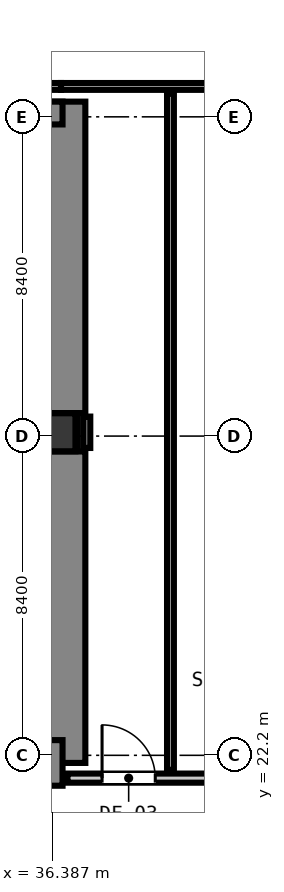
"""IFC4 building model, lengths in metres.
Left out: names, types, materials, properties, quantities, classifications, styles, units other than length and angle.
Written with IfcOpenShell. Run it as: python <this file> out.ifc"""

import sys

from ifc_helpers import new_model, si_unit, direction, frame, frame_2d, origin, origin_2d, place, context, subcontext, project, spatial, rectangle, extrude, element, fill, save


model = new_model("IFC4")
c1 = context("Model", 3, precision=1e-05, world=origin(), true_north=direction((0.0, 1.0)))
c2 = subcontext(c1, "Body", "Model", "MODEL_VIEW")
j1 = project(units=[si_unit("LENGTHUNIT", "METRE"), si_unit("PLANEANGLEUNIT", "RADIAN")], contexts=[c1])
p1 = place(None, origin())
s1 = spatial("IfcSite", under=j1, at=p1, CompositionType="ELEMENT")
p2 = place(p1, origin())
s2 = spatial("IfcBuilding", under=s1, at=p2, CompositionType="ELEMENT")
p3 = place(p2, frame((0.0, 0.0, -4.4)))
s3 = spatial("IfcBuildingStorey", under=s2, at=p3, CompositionType="ELEMENT", Elevation=-4.4)
p4 = place(p3, frame((36.5, 30.7, 0.0), z_axis=(0.0, 0.0, 1.0), x_axis=(1.0, 0.0, 0.0)))
e1 = element("IfcColumn", 1, at=p4, inside=s3, PredefinedType="COLUMN", context=c2, shape_type="SweptSolid", body=[
    extrude(rectangle(XDim=1.0, YDim=1.0, at=origin_2d()), origin(), (0.0, 0.0, 1.0), 4.4),
])
p5 = place(p3, frame((36.66, 22.0, 0.0), z_axis=(0.0, 0.0, 1.0), x_axis=(0.0, 1.0, 0.0)))
e2 = element("IfcWall", 2, at=p5, inside=s3, PredefinedType="SHEAR", context=c2, shape_type="SweptSolid", body=[
    extrude(rectangle(XDim=8.195, YDim=1.2, at=frame_2d((4.098, 0.0))), origin(), (0.0, 0.0, 1.0), 4.4),
])
p6 = place(p3, frame((36.66, 31.205, 0.0), z_axis=(0.0, 0.0, 1.0), x_axis=(0.0, 1.0, 0.0)))
e3 = element("IfcWall", 3, at=p6, inside=s3, PredefinedType="SHEAR", context=c2, shape_type="SweptSolid", body=[
    extrude(rectangle(XDim=8.195, YDim=1.2, at=frame_2d((4.097, 0.0))), origin(), (0.0, 0.0, 1.0), 4.4),
])
p7 = place(p3, frame((29.705, 22.0, 0.0), z_axis=(0.0, 0.0, 1.0), x_axis=(1.0, 0.0, 0.0)))
e4 = element("IfcWall", 4, at=p7, inside=s3, PredefinedType="SHEAR", context=c2, shape_type="SweptSolid", body=[
    extrude(rectangle(XDim=6.955, YDim=1.2, at=frame_2d((3.478, 0.0))), origin(), (0.0, 0.0, 1.0), 4.4),
])
p8 = place(p3, frame((32.58, 39.1, 0.0), z_axis=(0.0, 0.0, 1.0), x_axis=(1.0, 0.0, 0.0)))
e5 = element("IfcWall", 5, at=p8, inside=s3, PredefinedType="SHEAR", context=c2, shape_type="SweptSolid", body=[
    extrude(rectangle(XDim=4.08, YDim=0.6, at=frame_2d((2.04, 0.0))), origin(), (0.0, 0.0, 1.0), 4.4),
])
p9 = place(p3, frame((36.79, 21.6, 0.0), z_axis=(0.0, 0.0, 1.0), x_axis=(1.0, 0.0, 0.0)))
e6 = element("IfcWall", 6, at=p9, inside=s3, PredefinedType="PARTITIONING", context=c2, shape_type="SweptSolid", body=[
    extrude(rectangle(XDim=9.078, YDim=0.24, at=frame_2d((4.539, 0.0))), origin(), (0.0, 0.0, 1.0), 3.215),
])
p10 = place(p9, frame((0.91, 0.0, 0.0)))
e7 = element("IfcOpeningElement", 7, at=p10, cuts=e6, PredefinedType="OPENING", context=c2, shape_type="SweptSolid", body=[
    extrude(rectangle(XDim=1.4, YDim=2.15, at=frame_2d((0.7, 1.075))), frame((0.0, 0.13, 0.0), z_axis=(0.0, -1.0, 0.0), x_axis=(1.0, 0.0, 0.0)), (0.0, 0.0, 1.0), 0.26),
])
p11 = place(p3, frame((29.802, 39.8, 0.0), z_axis=(0.0, 0.0, 1.0), x_axis=(1.0, 0.0, 0.0)))
e8 = element("IfcWall", 8, at=p11, inside=s3, PredefinedType="PARTITIONING", context=c2, shape_type="SweptSolid", body=[
    extrude(rectangle(XDim=6.818, YDim=0.18, at=frame_2d((3.409, 0.0))), origin(), (0.0, 0.0, 1.0), 3.98),
])
p12 = place(p3, frame((36.62, 39.8, 0.0), z_axis=(0.0, 0.0, 1.0), x_axis=(1.0, 0.0, 0.0)))
e9 = element("IfcWall", 9, at=p12, inside=s3, PredefinedType="PARTITIONING", context=c2, shape_type="SweptSolid", body=[
    extrude(rectangle(XDim=4.542, YDim=0.18, at=frame_2d((2.271, 0.0))), origin(), (0.0, 0.0, 1.0), 1.595),
])
p13 = place(p3, frame((37.3, 30.287, 0.0), z_axis=(0.0, 0.0, 1.0), x_axis=(0.0, 1.0, 0.0)))
e10 = element("IfcWall", 10, at=p13, inside=s3, PredefinedType="PARTITIONING", context=c2, shape_type="SweptSolid", body=[
    extrude(rectangle(XDim=0.826, YDim=0.18, at=frame_2d((0.413, 0.0))), origin(), (0.0, 0.0, 1.0), 3.98),
])
p14 = place(p3, frame((39.5, 21.818, 0.0), z_axis=(0.0, 0.0, 1.0), x_axis=(0.0, 1.0, 0.0)))
e11 = element("IfcWall", 11, at=p14, inside=s3, PredefinedType="PARTITIONING", context=c2, shape_type="SweptSolid", body=[
    extrude(rectangle(XDim=17.794, YDim=0.18, at=frame_2d((8.897, 0.0))), origin(), (0.0, 0.0, 1.0), 3.98),
])
p15 = place(p3, frame((37.032, 30.21, 0.0), z_axis=(0.0, 0.0, 1.0), x_axis=(0.0, 1.0, 0.0)))
e12 = element("IfcWall", 12, at=p15, inside=s3, PredefinedType="PARTITIONING", context=c2, shape_type="SweptSolid", body=[
    extrude(rectangle(XDim=0.98, YDim=0.06, at=frame_2d((0.49, 0.0))), origin(), (0.0, 0.0, 1.0), 1.45),
])
p16 = place(p10, origin())
e13 = element("IfcDoor", 13, at=p16, inside=s3, OperationType="SINGLE_SWING_LEFT", PredefinedType="DOOR", context=c2, shape_type="SweptSolid", body=[
    extrude(rectangle(XDim=1.4, YDim=2.15, at=frame_2d((0.7, 1.075))), frame((0.0, 0.025, 0.0), z_axis=(0.0, -1.0, 0.0), x_axis=(1.0, 0.0, 0.0)), (0.0, 0.0, 1.0), 0.05),
])
fill(e7, e13)
save(model, sys.argv[1])
